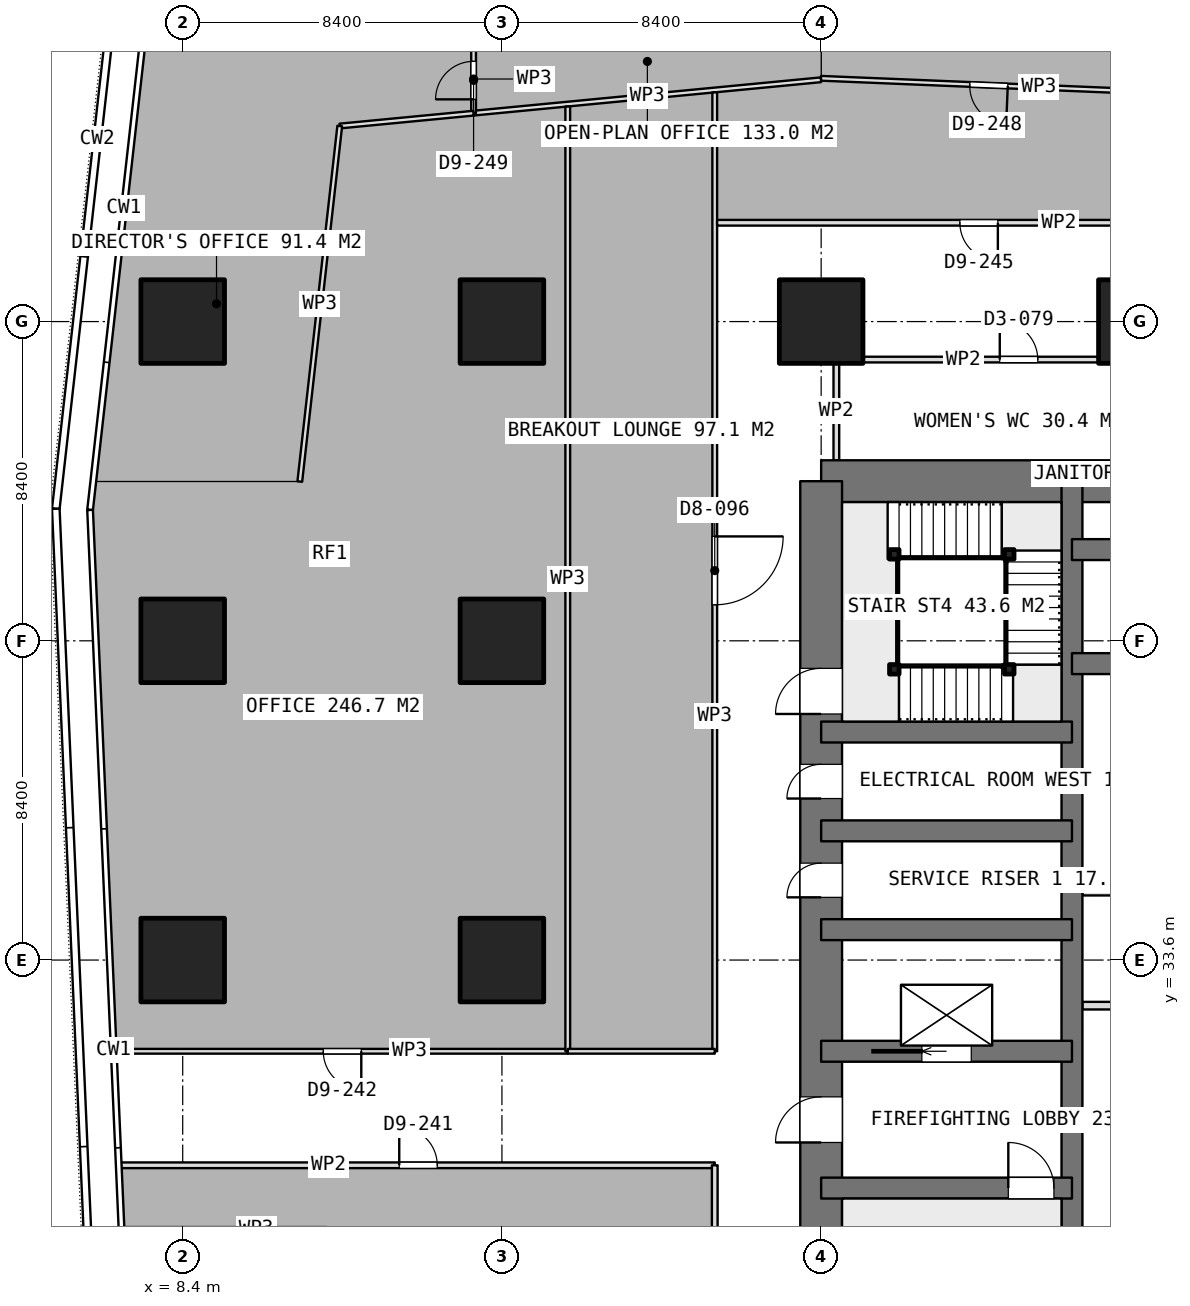
"""IFC4 building model, lengths in metres.
Left out: names, types, materials, properties, quantities, classifications, styles, units other than length and angle.
Written with IfcOpenShell. Run it as: python <this file> out.ifc"""

import sys

from ifc_helpers import new_model, si_unit, direction, frame, frame_2d, origin, origin_2d, place, context, subcontext, project, spatial, rectangle, extrude, element, fill, save


model = new_model("IFC4")
c1 = context("Model", 3, precision=1e-05, world=origin(), true_north=direction((0.0, 1.0)))
c2 = subcontext(c1, "Body", "Model", "MODEL_VIEW")
j1 = project(units=[si_unit("LENGTHUNIT", "METRE"), si_unit("PLANEANGLEUNIT", "RADIAN")], contexts=[c1])
p1 = place(None, origin())
s1 = spatial("IfcSite", under=j1, at=p1, CompositionType="ELEMENT")
p2 = place(p1, origin())
s2 = spatial("IfcBuilding", under=s1, at=p2, CompositionType="ELEMENT")
p3 = place(p2, frame((0.0, 0.0, 70.4)))
s3 = spatial("IfcBuildingStorey", under=s2, at=p3, CompositionType="ELEMENT", Elevation=70.4)
p4 = place(p3, frame((25.2, 46.2, 0.0), z_axis=(0.0, 0.0, 1.0), x_axis=(1.0, 0.0, 0.0)))
e1 = element("IfcWall", 1, at=p4, inside=s3, PredefinedType="SHEAR", context=c2, shape_type="SweptSolid", body=[
    extrude(rectangle(XDim=10.4, YDim=1.1, at=frame_2d((5.2, 0.0))), origin(), (0.0, 0.0, 1.0), 3.75),
])
p5 = place(p3, frame((25.2, 21.0, 0.0), z_axis=(0.0, 0.0, 1.0), x_axis=(0.0, 1.0, 0.0)))
e2 = element("IfcWall", 2, at=p5, inside=s3, PredefinedType="SHEAR", context=c2, shape_type="SweptSolid", body=[
    extrude(rectangle(XDim=25.2, YDim=1.1, at=frame_2d((12.6, 0.0))), origin(), (0.0, 0.0, 1.0), 3.75),
])
p6 = place(p5, frame((7.8, 0.0, 0.0)))
e3 = element("IfcOpeningElement", 3, at=p6, cuts=e2, PredefinedType="OPENING", context=c2, shape_type="SweptSolid", body=[
    extrude(rectangle(XDim=1.2, YDim=2.1, at=frame_2d((0.6, 1.05))), frame((0.0, 0.56, 0.0), z_axis=(0.0, -1.0, 0.0), x_axis=(1.0, 0.0, 0.0)), (0.0, 0.0, 1.0), 1.12),
])
p7 = place(p5, frame((14.25, 0.0, 0.0)))
e4 = element("IfcOpeningElement", 4, at=p7, cuts=e2, PredefinedType="OPENING", context=c2, shape_type="SweptSolid", body=[
    extrude(rectangle(XDim=0.9, YDim=2.1, at=frame_2d((0.45, 1.05))), frame((0.0, 0.56, 0.0), z_axis=(0.0, -1.0, 0.0), x_axis=(1.0, 0.0, 0.0)), (0.0, 0.0, 1.0), 1.12),
])
p8 = place(p5, frame((16.85, 0.0, 0.0)))
e5 = element("IfcOpeningElement", 5, at=p8, cuts=e2, PredefinedType="OPENING", context=c2, shape_type="SweptSolid", body=[
    extrude(rectangle(XDim=0.9, YDim=2.1, at=frame_2d((0.45, 1.05))), frame((0.0, 0.56, 0.0), z_axis=(0.0, -1.0, 0.0), x_axis=(1.0, 0.0, 0.0)), (0.0, 0.0, 1.0), 1.12),
])
p9 = place(p5, frame((19.075, 0.0, 0.0)))
e6 = element("IfcOpeningElement", 6, at=p9, cuts=e2, PredefinedType="OPENING", context=c2, shape_type="SweptSolid", body=[
    extrude(rectangle(XDim=1.2, YDim=2.1, at=frame_2d((0.6, 1.05))), frame((0.0, 0.56, 0.0), z_axis=(0.0, -1.0, 0.0), x_axis=(1.0, 0.0, 0.0)), (0.0, 0.0, 1.0), 1.12),
])
p10 = place(p3, frame((31.8, 21.0, 0.0), z_axis=(0.0, 0.0, 1.0), x_axis=(0.0, 1.0, 0.0)))
e7 = element("IfcWall", 7, at=p10, inside=s3, PredefinedType="SHEAR", context=c2, shape_type="SweptSolid", body=[
    extrude(rectangle(XDim=25.2, YDim=0.55, at=frame_2d((12.6, 0.0))), origin(), (0.0, 0.0, 1.0), 3.75),
])
for number, where, z_axis, x_axis in (
    (8, (31.8, 41.4, 0.0), (0.0, 0.0, 1.0), (1.0, 0.0, 0.0)),
    (9, (31.8, 44.4, 0.0), (0.0, 0.0, 1.0), (1.0, 0.0, 0.0)),
):
    element("IfcWall", number, at=place(p3, frame(where, z_axis=z_axis, x_axis=x_axis)), inside=s3, PredefinedType="SHEAR", context=c2, shape_type="SweptSolid", body=[
        extrude(rectangle(XDim=3.8, YDim=0.55, at=frame_2d((1.9, 0.0))), origin(), (0.0, 0.0, 1.0), 3.75),
    ])
p11 = place(p3, frame((25.2, 27.6, 0.0), z_axis=(0.0, 0.0, 1.0), x_axis=(1.0, 0.0, 0.0)))
e10 = element("IfcWall", 10, at=p11, inside=s3, PredefinedType="SHEAR", context=c2, shape_type="SweptSolid", body=[
    extrude(rectangle(XDim=6.6, YDim=0.55, at=frame_2d((3.3, 0.0))), origin(), (0.0, 0.0, 1.0), 3.75),
])
p12 = place(p11, frame((4.925, 0.0, 0.0)))
e11 = element("IfcOpeningElement", 11, at=p12, cuts=e10, PredefinedType="OPENING", context=c2, shape_type="SweptSolid", body=[
    extrude(rectangle(XDim=1.2, YDim=2.1, at=frame_2d((0.6, 1.05))), frame((0.0, 0.285, 0.0), z_axis=(0.0, -1.0, 0.0), x_axis=(1.0, 0.0, 0.0)), (0.0, 0.0, 1.0), 0.57),
])
p13 = place(p3, frame((25.2, 31.2, 0.0), z_axis=(0.0, 0.0, 1.0), x_axis=(1.0, 0.0, 0.0)))
e12 = element("IfcWall", 12, at=p13, inside=s3, PredefinedType="SHEAR", context=c2, shape_type="SweptSolid", body=[
    extrude(rectangle(XDim=6.6, YDim=0.55, at=frame_2d((3.3, 0.0))), origin(), (0.0, 0.0, 1.0), 3.75),
])
p14 = place(p13, frame((2.65, 0.0, 0.0)))
e13 = element("IfcOpeningElement", 13, at=p14, cuts=e12, PredefinedType="OPENING", context=c2, shape_type="SweptSolid", body=[
    extrude(rectangle(XDim=1.3, YDim=2.1, at=frame_2d((0.65, 1.05))), frame((0.0, 0.285, 0.0), z_axis=(0.0, -1.0, 0.0), x_axis=(1.0, 0.0, 0.0)), (0.0, 0.0, 1.0), 0.57),
])
for number, where, z_axis, x_axis in (
    (14, (25.2, 34.4, 0.0), (0.0, 0.0, 1.0), (1.0, 0.0, 0.0)),
    (15, (25.2, 37.0, 0.0), (0.0, 0.0, 1.0), (1.0, 0.0, 0.0)),
    (16, (25.2, 39.6, 0.0), (0.0, 0.0, 1.0), (1.0, 0.0, 0.0)),
):
    element("IfcWall", number, at=place(p3, frame(where, z_axis=z_axis, x_axis=x_axis)), inside=s3, PredefinedType="SHEAR", context=c2, shape_type="SweptSolid", body=[
        extrude(rectangle(XDim=6.6, YDim=0.55, at=frame_2d((3.3, 0.0))), origin(), (0.0, 0.0, 1.0), 3.75),
    ])
for number, where, z_axis, x_axis in (
    (17, (8.4, 33.6, 0.0), (0.0, 0.0, 1.0), (1.0, 0.0, 0.0)),
    (18, (8.4, 42.0, 0.0), (0.0, 0.0, 1.0), (1.0, 0.0, 0.0)),
    (19, (8.4, 50.4, 0.0), (0.0, 0.0, 1.0), (1.0, 0.0, 0.0)),
    (20, (16.8, 33.6, 0.0), (0.0, 0.0, 1.0), (1.0, 0.0, 0.0)),
    (21, (16.8, 42.0, 0.0), (0.0, 0.0, 1.0), (1.0, 0.0, 0.0)),
    (22, (16.8, 50.4, 0.0), (0.0, 0.0, 1.0), (1.0, 0.0, 0.0)),
    (23, (25.2, 50.4, 0.0), (0.0, 0.0, 1.0), (1.0, 0.0, 0.0)),
    (24, (33.6, 50.4, 0.0), (0.0, 0.0, 1.0), (1.0, 0.0, 0.0)),
):
    element("IfcColumn", number, at=place(p3, frame(where, z_axis=z_axis, x_axis=x_axis)), inside=s3, PredefinedType="COLUMN", context=c2, shape_type="SweptSolid", body=[
        extrude(rectangle(XDim=2.2, YDim=2.2, at=origin_2d()), origin(), (0.0, 0.0, 1.0), 3.75),
    ])
for number, where, z_axis, x_axis in (
    (25, (32.075, 29.4, 0.0), (0.0, 0.0, 1.0), (1.0, 0.0, 0.0)),
    (26, (32.075, 32.4, 0.0), (0.0, 0.0, 1.0), (1.0, 0.0, 0.0)),
    (27, (32.075, 35.4, 0.0), (0.0, 0.0, 1.0), (1.0, 0.0, 0.0)),
    (28, (32.075, 38.4, 0.0), (0.0, 0.0, 1.0), (1.0, 0.0, 0.0)),
):
    element("IfcWall", number, at=place(p3, frame(where, z_axis=z_axis, x_axis=x_axis)), inside=s3, PredefinedType="PARTITIONING", context=c2, shape_type="SweptSolid", body=[
        extrude(rectangle(XDim=3.25, YDim=0.2, at=frame_2d((1.625, 0.0))), origin(), (0.0, 0.0, 1.0), 3.5),
    ])
p15 = place(p3, frame((25.525, 49.4, 0.0), z_axis=(0.0, 0.0, 1.0), x_axis=(1.0, 0.0, 0.0)))
e29 = element("IfcWall", 29, at=p15, inside=s3, PredefinedType="PARTITIONING", context=c2, shape_type="SweptSolid", body=[
    extrude(rectangle(XDim=9.75, YDim=0.15, at=frame_2d((4.875, 0.0))), origin(), (0.0, 0.0, 1.0), 3.5),
])
p16 = place(p15, frame((4.375, 0.0, 0.0)))
e30 = element("IfcOpeningElement", 30, at=p16, cuts=e29, PredefinedType="OPENING", context=c2, shape_type="SweptSolid", body=[
    extrude(rectangle(XDim=1.0, YDim=2.1, at=frame_2d((0.5, 1.05))), frame((0.0, 0.085, 0.0), z_axis=(0.0, -1.0, 0.0), x_axis=(1.0, 0.0, 0.0)), (0.0, 0.0, 1.0), 0.17),
])
p17 = place(p3, frame((25.6, 46.75, 0.0), z_axis=(0.0, 0.0, 1.0), x_axis=(0.0, 1.0, 0.0)))
e31 = element("IfcWall", 31, at=p17, inside=s3, PredefinedType="PARTITIONING", context=c2, shape_type="SweptSolid", body=[
    extrude(rectangle(XDim=2.575, YDim=0.15, at=frame_2d((1.288, 0.0))), origin(), (0.0, 0.0, 1.0), 3.5),
])
p18 = place(p3, frame((34.021, 56.437, 0.0), z_axis=(0.0, 0.0, 1.0), x_axis=(-0.999150375519, 0.041213190857, 0.0)))
e32 = element("IfcWall", 32, at=p18, inside=s3, PredefinedType="PARTITIONING", context=c2, shape_type="SweptSolid", body=[
    extrude(rectangle(XDim=8.833, YDim=0.125, at=frame_2d((4.416, 0.0))), origin(), (0.0, 0.0, 1.0), 3.5),
])
p19 = place(p18, frame((3.914, 0.0, 0.0)))
e33 = element("IfcOpeningElement", 33, at=p19, cuts=e32, PredefinedType="OPENING", context=c2, shape_type="SweptSolid", body=[
    extrude(rectangle(XDim=1.0, YDim=2.1, at=frame_2d((0.5, 1.05))), frame((0.0, 0.073, 0.0), z_axis=(0.0, -1.0, 0.0), x_axis=(1.0, 0.0, 0.0)), (0.0, 0.0, 1.0), 0.145),
])
p20 = place(p3, frame((25.194, 56.762, 0.0), z_axis=(0.0, 0.0, 1.0), x_axis=(-0.995418669547, -0.095612092945, 0.0)))
e34 = element("IfcWall", 34, at=p20, inside=s3, PredefinedType="PARTITIONING", context=c2, shape_type="SweptSolid", body=[
    extrude(rectangle(XDim=9.182, YDim=0.125, at=frame_2d((4.591, 0.0))), origin(), (0.0, 0.0, 1.0), 3.5),
])
p21 = place(p3, frame((16.054, 55.884, 0.0), z_axis=(0.0, 0.0, 1.0), x_axis=(0.0, 1.0, 0.0)))
e35 = element("IfcWall", 35, at=p21, inside=s3, PredefinedType="PARTITIONING", context=c2, shape_type="SweptSolid", body=[
    extrude(rectangle(XDim=1.796, YDim=0.125, at=frame_2d((0.898, 0.0))), origin(), (0.0, 0.0, 1.0), 3.5),
])
p22 = place(p21, frame((0.363, 0.0, 0.0)))
e36 = element("IfcOpeningElement", 36, at=p22, cuts=e35, PredefinedType="OPENING", context=c2, shape_type="SweptSolid", body=[
    extrude(rectangle(XDim=1.0, YDim=2.1, at=frame_2d((0.5, 1.05))), frame((0.0, 0.073, 0.0), z_axis=(0.0, -1.0, 0.0), x_axis=(1.0, 0.0, 0.0)), (0.0, 0.0, 1.0), 0.145),
])
p23 = place(p3, frame((16.053, 55.883, 0.0), z_axis=(0.0, 0.0, 1.0), x_axis=(-0.995420403314, -0.095594040951, 0.0)))
e37 = element("IfcWall", 37, at=p23, inside=s3, PredefinedType="PARTITIONING", context=c2, shape_type="SweptSolid", body=[
    extrude(rectangle(XDim=3.537, YDim=0.125, at=frame_2d((1.769, 0.0))), origin(), (0.0, 0.0, 1.0), 3.5),
])
p24 = place(p3, frame((12.532, 55.545, 0.0), z_axis=(0.0, 0.0, 1.0), x_axis=(-0.111658384145, -0.993746650435, 0.0)))
e38 = element("IfcWall", 38, at=p24, inside=s3, PredefinedType="PARTITIONING", context=c2, shape_type="SweptSolid", body=[
    extrude(rectangle(XDim=9.413, YDim=0.125, at=frame_2d((4.707, 0.0))), origin(), (0.0, 0.0, 1.0), 3.5),
])
p25 = place(p3, frame((18.532, 31.2, 0.0), z_axis=(0.0, 0.0, 1.0), x_axis=(-1.0, 0.0, 0.0)))
e39 = element("IfcWall", 39, at=p25, inside=s3, PredefinedType="PARTITIONING", context=c2, shape_type="SweptSolid", body=[
    extrude(rectangle(XDim=11.897, YDim=0.125, at=frame_2d((5.948, 0.0))), origin(), (0.0, 0.0, 1.0), 3.5),
])
p26 = place(p25, frame((5.433, 0.0, 0.0)))
e40 = element("IfcOpeningElement", 40, at=p26, cuts=e39, PredefinedType="OPENING", context=c2, shape_type="SweptSolid", body=[
    extrude(rectangle(XDim=1.0, YDim=2.1, at=frame_2d((0.5, 1.05))), frame((0.0, 0.073, 0.0), z_axis=(0.0, -1.0, 0.0), x_axis=(1.0, 0.0, 0.0)), (0.0, 0.0, 1.0), 0.145),
])
p27 = place(p3, frame((18.532, 56.059, 0.0), z_axis=(0.0, 0.0, 1.0), x_axis=(0.0, -1.0, 0.0)))
e41 = element("IfcWall", 41, at=p27, inside=s3, PredefinedType="PARTITIONING", context=c2, shape_type="SweptSolid", body=[
    extrude(rectangle(XDim=24.859, YDim=0.125, at=frame_2d((12.43, 0.0))), origin(), (0.0, 0.0, 1.0), 3.5),
])
p28 = place(p3, frame((22.4, 56.431, 0.0), z_axis=(0.0, 0.0, 1.0), x_axis=(0.0, -1.0, 0.0)))
e42 = element("IfcWall", 42, at=p28, inside=s3, PredefinedType="PARTITIONING", context=c2, shape_type="SweptSolid", body=[
    extrude(rectangle(XDim=25.231, YDim=0.125, at=frame_2d((12.615, 0.0))), origin(), (0.0, 0.0, 1.0), 3.5),
])
p29 = place(p28, frame((11.684, 0.0, 0.0)))
e43 = element("IfcOpeningElement", 43, at=p29, cuts=e42, PredefinedType="OPENING", context=c2, shape_type="SweptSolid", body=[
    extrude(rectangle(XDim=1.8, YDim=2.1, at=frame_2d((0.9, 1.05))), frame((0.0, 0.073, 0.0), z_axis=(0.0, -1.0, 0.0), x_axis=(1.0, 0.0, 0.0)), (0.0, 0.0, 1.0), 0.145),
])
p30 = place(p3, frame((22.4, 31.2, 0.0), z_axis=(0.0, 0.0, 1.0), x_axis=(-1.0, 0.0, 0.0)))
e44 = element("IfcWall", 44, at=p30, inside=s3, PredefinedType="PARTITIONING", context=c2, shape_type="SweptSolid", body=[
    extrude(rectangle(XDim=3.868, YDim=0.125, at=frame_2d((1.934, 0.0))), origin(), (0.0, 0.0, 1.0), 3.5),
])
p31 = place(p3, frame((36.3, 53.0, 0.0), z_axis=(0.0, 0.0, 1.0), x_axis=(-1.0, 0.0, 0.0)))
e45 = element("IfcWall", 45, at=p31, inside=s3, PredefinedType="PARTITIONING", context=c2, shape_type="SweptSolid", body=[
    extrude(rectangle(XDim=13.838, YDim=0.15, at=frame_2d((6.919, 0.0))), origin(), (0.0, 0.0, 1.0), 3.5),
])
p32 = place(p31, frame((6.45, 0.0, 0.0)))
e46 = element("IfcOpeningElement", 46, at=p32, cuts=e45, PredefinedType="OPENING", context=c2, shape_type="SweptSolid", body=[
    extrude(rectangle(XDim=1.0, YDim=2.1, at=frame_2d((0.5, 1.05))), frame((0.0, 0.085, 0.0), z_axis=(0.0, -1.0, 0.0), x_axis=(1.0, 0.0, 0.0)), (0.0, 0.0, 1.0), 0.17),
])
p33 = place(p3, frame((6.767, 28.2, 0.0), z_axis=(0.0, 0.0, 1.0), x_axis=(1.0, 0.0, 0.0)))
e47 = element("IfcWall", 47, at=p33, inside=s3, PredefinedType="PARTITIONING", context=c2, shape_type="SweptSolid", body=[
    extrude(rectangle(XDim=15.633, YDim=0.15, at=frame_2d((7.816, 0.0))), origin(), (0.0, 0.0, 1.0), 3.5),
])
p34 = place(p33, frame((7.331, 0.0, 0.0)))
e48 = element("IfcOpeningElement", 48, at=p34, cuts=e47, PredefinedType="OPENING", context=c2, shape_type="SweptSolid", body=[
    extrude(rectangle(XDim=1.0, YDim=2.1, at=frame_2d((0.5, 1.05))), frame((0.0, 0.085, 0.0), z_axis=(0.0, -1.0, 0.0), x_axis=(1.0, 0.0, 0.0)), (0.0, 0.0, 1.0), 0.17),
])
p35 = place(p3, frame((22.4, 28.2, 0.0), z_axis=(0.0, 0.0, 1.0), x_axis=(0.0, -1.0, 0.0)))
e49 = element("IfcWall", 49, at=p35, inside=s3, PredefinedType="PARTITIONING", context=c2, shape_type="SweptSolid", body=[
    extrude(rectangle(XDim=14.0, YDim=0.15, at=frame_2d((7.0, 0.0))), origin(), (0.0, 0.0, 1.0), 3.5),
])
for number, where, z_axis, x_axis in (
    (50, (27.125, 41.25, 0.0), (0.0, 0.0, 1.0), (1.0, 0.0, 0.0)),
    (51, (30.15, 41.25, 0.0), (0.0, 0.0, 1.0), (1.0, 0.0, 0.0)),
    (52, (30.15, 44.275, 0.0), (0.0, 0.0, 1.0), (1.0, 0.0, 0.0)),
    (53, (27.125, 44.275, 0.0), (0.0, 0.0, 1.0), (1.0, 0.0, 0.0)),
):
    element("IfcColumn", number, at=place(p3, frame(where, z_axis=z_axis, x_axis=x_axis)), inside=s3, PredefinedType="COLUMN", context=c2, shape_type="SweptSolid", body=[
        extrude(rectangle(XDim=0.25, YDim=0.25, at=origin_2d()), origin(), (0.0, 0.0, 1.0), 3.75),
    ])
p36 = place(p6, origin())
e54 = element("IfcDoor", 54, at=p36, inside=s3, OperationType="SINGLE_SWING_LEFT", PredefinedType="DOOR", context=c2, shape_type="SweptSolid", body=[
    extrude(rectangle(XDim=1.2, YDim=2.1, at=frame_2d((0.6, 1.05))), frame((0.0, 0.025, 0.0), z_axis=(0.0, -1.0, 0.0), x_axis=(1.0, 0.0, 0.0)), (0.0, 0.0, 1.0), 0.05),
])
fill(e3, e54)
p37 = place(p7, origin())
e55 = element("IfcDoor", 55, at=p37, inside=s3, OperationType="SINGLE_SWING_LEFT", PredefinedType="DOOR", context=c2, shape_type="SweptSolid", body=[
    extrude(rectangle(XDim=0.9, YDim=2.1, at=frame_2d((0.45, 1.05))), frame((0.0, 0.025, 0.0), z_axis=(0.0, -1.0, 0.0), x_axis=(1.0, 0.0, 0.0)), (0.0, 0.0, 1.0), 0.05),
])
fill(e4, e55)
p38 = place(p8, origin())
e56 = element("IfcDoor", 56, at=p38, inside=s3, OperationType="SINGLE_SWING_LEFT", PredefinedType="DOOR", context=c2, shape_type="SweptSolid", body=[
    extrude(rectangle(XDim=0.9, YDim=2.1, at=frame_2d((0.45, 1.05))), frame((0.0, 0.025, 0.0), z_axis=(0.0, -1.0, 0.0), x_axis=(1.0, 0.0, 0.0)), (0.0, 0.0, 1.0), 0.05),
])
fill(e5, e56)
p39 = place(p14, origin())
e57 = element("IfcDoor", 57, at=p39, inside=s3, OperationType="SLIDING_TO_LEFT", PredefinedType="USERDEFINED", context=c2, shape_type="SweptSolid", body=[
    extrude(rectangle(XDim=1.3, YDim=2.1, at=frame_2d((0.65, 1.05))), frame((0.0, 0.025, 0.0), z_axis=(0.0, -1.0, 0.0), x_axis=(1.0, 0.0, 0.0)), (0.0, 0.0, 1.0), 0.05),
])
fill(e13, e57)
p40 = place(p16, origin())
e58 = element("IfcDoor", 58, at=p40, inside=s3, OperationType="SINGLE_SWING_LEFT", PredefinedType="DOOR", context=c2, shape_type="SweptSolid", body=[
    extrude(rectangle(XDim=1.0, YDim=2.1, at=frame_2d((0.5, 1.05))), frame((0.0, 0.025, 0.0), z_axis=(0.0, -1.0, 0.0), x_axis=(1.0, 0.0, 0.0)), (0.0, 0.0, 1.0), 0.05),
])
fill(e30, e58)
p41 = place(p19, origin())
e59 = element("IfcDoor", 59, at=p41, inside=s3, OperationType="SINGLE_SWING_LEFT", PredefinedType="DOOR", context=c2, shape_type="SweptSolid", body=[
    extrude(rectangle(XDim=1.0, YDim=2.1, at=frame_2d((0.5, 1.05))), frame((0.0, 0.025, 0.0), z_axis=(0.0, -1.0, 0.0), x_axis=(1.0, 0.0, 0.0)), (0.0, 0.0, 1.0), 0.05),
])
fill(e33, e59)
p42 = place(p26, origin())
e60 = element("IfcDoor", 60, at=p42, inside=s3, OperationType="SINGLE_SWING_LEFT", PredefinedType="DOOR", context=c2, shape_type="SweptSolid", body=[
    extrude(rectangle(XDim=1.0, YDim=2.1, at=frame_2d((0.5, 1.05))), frame((0.0, 0.025, 0.0), z_axis=(0.0, -1.0, 0.0), x_axis=(1.0, 0.0, 0.0)), (0.0, 0.0, 1.0), 0.05),
])
fill(e40, e60)
p43 = place(p29, origin())
e61 = element("IfcDoor", 61, at=p43, inside=s3, OperationType="DOUBLE_DOOR_SINGLE_SWING", PredefinedType="DOOR", context=c2, shape_type="SweptSolid", body=[
    extrude(rectangle(XDim=1.8, YDim=2.1, at=frame_2d((0.9, 1.05))), frame((0.0, 0.025, 0.0), z_axis=(0.0, -1.0, 0.0), x_axis=(1.0, 0.0, 0.0)), (0.0, 0.0, 1.0), 0.05),
])
fill(e43, e61)
p44 = place(p32, origin())
e62 = element("IfcDoor", 62, at=p44, inside=s3, OperationType="SINGLE_SWING_LEFT", PredefinedType="DOOR", context=c2, shape_type="SweptSolid", body=[
    extrude(rectangle(XDim=1.0, YDim=2.1, at=frame_2d((0.5, 1.05))), frame((0.0, 0.025, 0.0), z_axis=(0.0, -1.0, 0.0), x_axis=(1.0, 0.0, 0.0)), (0.0, 0.0, 1.0), 0.05),
])
fill(e46, e62)
p45 = place(p34, origin())
e63 = element("IfcDoor", 63, at=p45, inside=s3, OperationType="SINGLE_SWING_LEFT", PredefinedType="DOOR", context=c2, shape_type="SweptSolid", body=[
    extrude(rectangle(XDim=1.0, YDim=2.1, at=frame_2d((0.5, 1.05))), frame((0.0, 0.025, 0.0), z_axis=(0.0, -1.0, 0.0), x_axis=(1.0, 0.0, 0.0)), (0.0, 0.0, 1.0), 0.05),
])
fill(e48, e63)
p46 = place(p22, origin())
e64 = element("IfcDoor", 64, at=p46, inside=s3, OperationType="SINGLE_SWING_LEFT", PredefinedType="DOOR", context=c2, shape_type="SweptSolid", body=[
    extrude(rectangle(XDim=1.0, YDim=2.1, at=frame_2d((0.5, 1.05))), frame((0.0, 0.025, 0.0), z_axis=(0.0, -1.0, 0.0), x_axis=(1.0, 0.0, 0.0)), (0.0, 0.0, 1.0), 0.05),
])
fill(e36, e64)
p47 = place(p12, origin())
e65 = element("IfcDoor", 65, at=p47, inside=s3, OperationType="SINGLE_SWING_RIGHT", PredefinedType="DOOR", context=c2, shape_type="SweptSolid", body=[
    extrude(rectangle(XDim=1.2, YDim=2.1, at=frame_2d((0.6, 1.05))), frame((0.0, 0.025, 0.0), z_axis=(0.0, -1.0, 0.0), x_axis=(1.0, 0.0, 0.0)), (0.0, 0.0, 1.0), 0.05),
])
fill(e11, e65)
p48 = place(p9, origin())
e66 = element("IfcDoor", 66, at=p48, inside=s3, OperationType="SINGLE_SWING_RIGHT", PredefinedType="DOOR", context=c2, shape_type="SweptSolid", body=[
    extrude(rectangle(XDim=1.2, YDim=2.1, at=frame_2d((0.6, 1.05))), frame((0.0, 0.025, 0.0), z_axis=(0.0, -1.0, 0.0), x_axis=(1.0, 0.0, 0.0)), (0.0, 0.0, 1.0), 0.05),
])
fill(e6, e66)
save(model, sys.argv[1])
